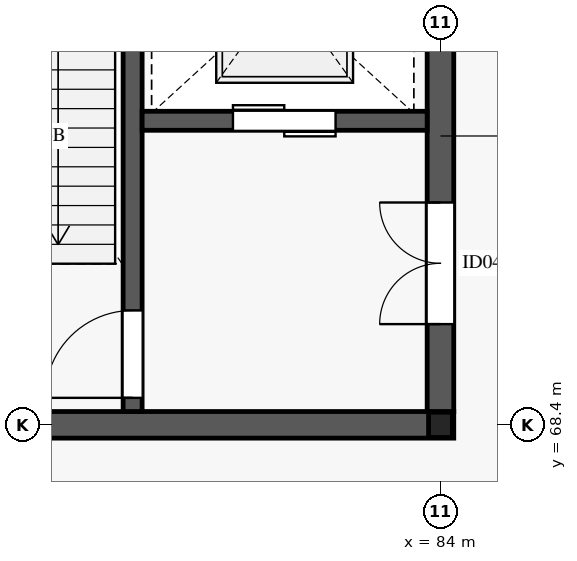
"""IFC4 building model, lengths in metres.
Left out: names, types, materials, properties, quantities, classifications, styles, units other than length and angle.
Written with IfcOpenShell. Run it as: python <this file> out.ifc"""

import sys

from ifc_helpers import new_model, si_unit, direction, frame, frame_2d, origin, origin_2d, place, context, subcontext, project, spatial, rectangle, i_section, extrude, element, fill, save


model = new_model("IFC4")
c1 = context("Model", 3, precision=1e-05, world=origin(), true_north=direction((0.0, 1.0)))
c2 = subcontext(c1, "Body", "Model", "MODEL_VIEW")
j1 = project(units=[si_unit("LENGTHUNIT", "METRE"), si_unit("PLANEANGLEUNIT", "RADIAN")], contexts=[c1])
p1 = place(None, origin())
s1 = spatial("IfcSite", under=j1, at=p1, CompositionType="ELEMENT")
p2 = place(p1, origin())
s2 = spatial("IfcBuilding", under=s1, at=p2, CompositionType="ELEMENT")
p3 = place(p2, frame((0.0, 0.0, 20.4)))
s3 = spatial("IfcBuildingStorey", under=s2, at=p3, CompositionType="ELEMENT", Elevation=20.4)
p4 = place(p3, frame((84.0, 68.4, 0.0), z_axis=(0.0, 0.0, 1.0), x_axis=(1.0, 0.0, 0.0)))
e1 = element("IfcColumn", 1, at=p4, inside=s3, PredefinedType="COLUMN", context=c2, shape_type="SweptSolid", body=[
    extrude(i_section(OverallWidth=0.313, OverallDepth=0.333, WebThickness=0.018, FlangeThickness=0.028, FilletRadius=0.015, at=origin_2d()), origin(), (0.0, 0.0, 1.0), 4.595),
])
p5 = place(p3, frame((75.825, 68.4, 0.0), z_axis=(0.0, 0.0, 1.0), x_axis=(1.0, 0.0, 0.0)))
e2 = element("IfcWall", 2, at=p5, inside=s3, PredefinedType="SHEAR", context=c2, shape_type="SweptSolid", body=[
    extrude(rectangle(XDim=8.35, YDim=0.35, at=frame_2d((4.175, 0.0))), origin(), (0.0, 0.0, 1.0), 4.59),
])
p6 = place(p3, frame((84.0, 68.575, 0.0), z_axis=(0.0, 0.0, 1.0), x_axis=(0.0, 1.0, 0.0)))
e3 = element("IfcWall", 3, at=p6, inside=s3, PredefinedType="SHEAR", context=c2, shape_type="SweptSolid", body=[
    extrude(rectangle(XDim=7.25, YDim=0.35, at=frame_2d((3.625, 0.0))), origin(), (0.0, 0.0, 1.0), 4.59),
])
p7 = place(p6, frame((1.15, 0.0, 0.0)))
e4 = element("IfcOpeningElement", 4, at=p7, cuts=e3, PredefinedType="OPENING", context=c2, shape_type="SweptSolid", body=[
    extrude(rectangle(XDim=1.6, YDim=2.35, at=frame_2d((0.8, 1.175))), frame((0.0, 0.185, 0.0), z_axis=(0.0, -1.0, 0.0), x_axis=(1.0, 0.0, 0.0)), (0.0, 0.0, 1.0), 0.37),
])
p8 = place(p3, frame((79.95, 68.575, 0.0), z_axis=(0.0, 0.0, 1.0), x_axis=(0.0, 1.0, 0.0)))
e5 = element("IfcWall", 5, at=p8, inside=s3, PredefinedType="SHEAR", context=c2, shape_type="SweptSolid", body=[
    extrude(rectangle(XDim=7.25, YDim=0.25, at=frame_2d((3.625, 0.0))), origin(), (0.0, 0.0, 1.0), 4.59),
])
p9 = place(p8, frame((0.18, 0.0, 0.0)))
e6 = element("IfcOpeningElement", 6, at=p9, cuts=e5, PredefinedType="OPENING", context=c2, shape_type="SweptSolid", body=[
    extrude(rectangle(XDim=1.15, YDim=2.2, at=frame_2d((0.575, 1.1))), frame((0.0, 0.135, 0.0), z_axis=(0.0, -1.0, 0.0), x_axis=(1.0, 0.0, 0.0)), (0.0, 0.0, 1.0), 0.27),
])
p10 = place(p3, frame((80.075, 72.4, 0.0), z_axis=(0.0, 0.0, 1.0), x_axis=(1.0, 0.0, 0.0)))
e7 = element("IfcWall", 7, at=p10, inside=s3, PredefinedType="SHEAR", context=c2, shape_type="SweptSolid", body=[
    extrude(rectangle(XDim=3.75, YDim=0.25, at=frame_2d((1.875, 0.0))), origin(), (0.0, 0.0, 1.0), 4.59),
])
p11 = place(p10, frame((1.195, 0.0, 0.0)))
e8 = element("IfcOpeningElement", 8, at=p11, cuts=e7, PredefinedType="OPENING", context=c2, shape_type="SweptSolid", body=[
    extrude(rectangle(XDim=1.35, YDim=2.2, at=frame_2d((0.675, 1.1))), frame((0.0, 0.135, 0.0), z_axis=(0.0, -1.0, 0.0), x_axis=(1.0, 0.0, 0.0)), (0.0, 0.0, 1.0), 0.27),
])
p12 = place(p9, origin())
e9 = element("IfcDoor", 9, at=p12, inside=s3, OperationType="SINGLE_SWING_LEFT", PredefinedType="DOOR", context=c2, shape_type="SweptSolid", body=[
    extrude(rectangle(XDim=1.15, YDim=2.2, at=frame_2d((0.575, 1.1))), frame((0.0, 0.025, 0.0), z_axis=(0.0, -1.0, 0.0), x_axis=(1.0, 0.0, 0.0)), (0.0, 0.0, 1.0), 0.05),
])
fill(e6, e9)
p13 = place(p7, origin())
e10 = element("IfcDoor", 10, at=p13, inside=s3, OperationType="DOUBLE_DOOR_SINGLE_SWING", PredefinedType="DOOR", context=c2, shape_type="SweptSolid", body=[
    extrude(rectangle(XDim=1.6, YDim=2.35, at=frame_2d((0.8, 1.175))), frame((0.0, 0.025, 0.0), z_axis=(0.0, -1.0, 0.0), x_axis=(1.0, 0.0, 0.0)), (0.0, 0.0, 1.0), 0.05),
])
fill(e4, e10)
p14 = place(p11, origin())
e11 = element("IfcDoor", 11, at=p14, inside=s3, OperationType="DOUBLE_DOOR_SLIDING", PredefinedType="DOOR", context=c2, shape_type="SweptSolid", body=[
    extrude(rectangle(XDim=1.35, YDim=2.2, at=frame_2d((0.675, 1.1))), frame((0.0, 0.025, 0.0), z_axis=(0.0, -1.0, 0.0), x_axis=(1.0, 0.0, 0.0)), (0.0, 0.0, 1.0), 0.05),
])
fill(e8, e11)
save(model, sys.argv[1])
